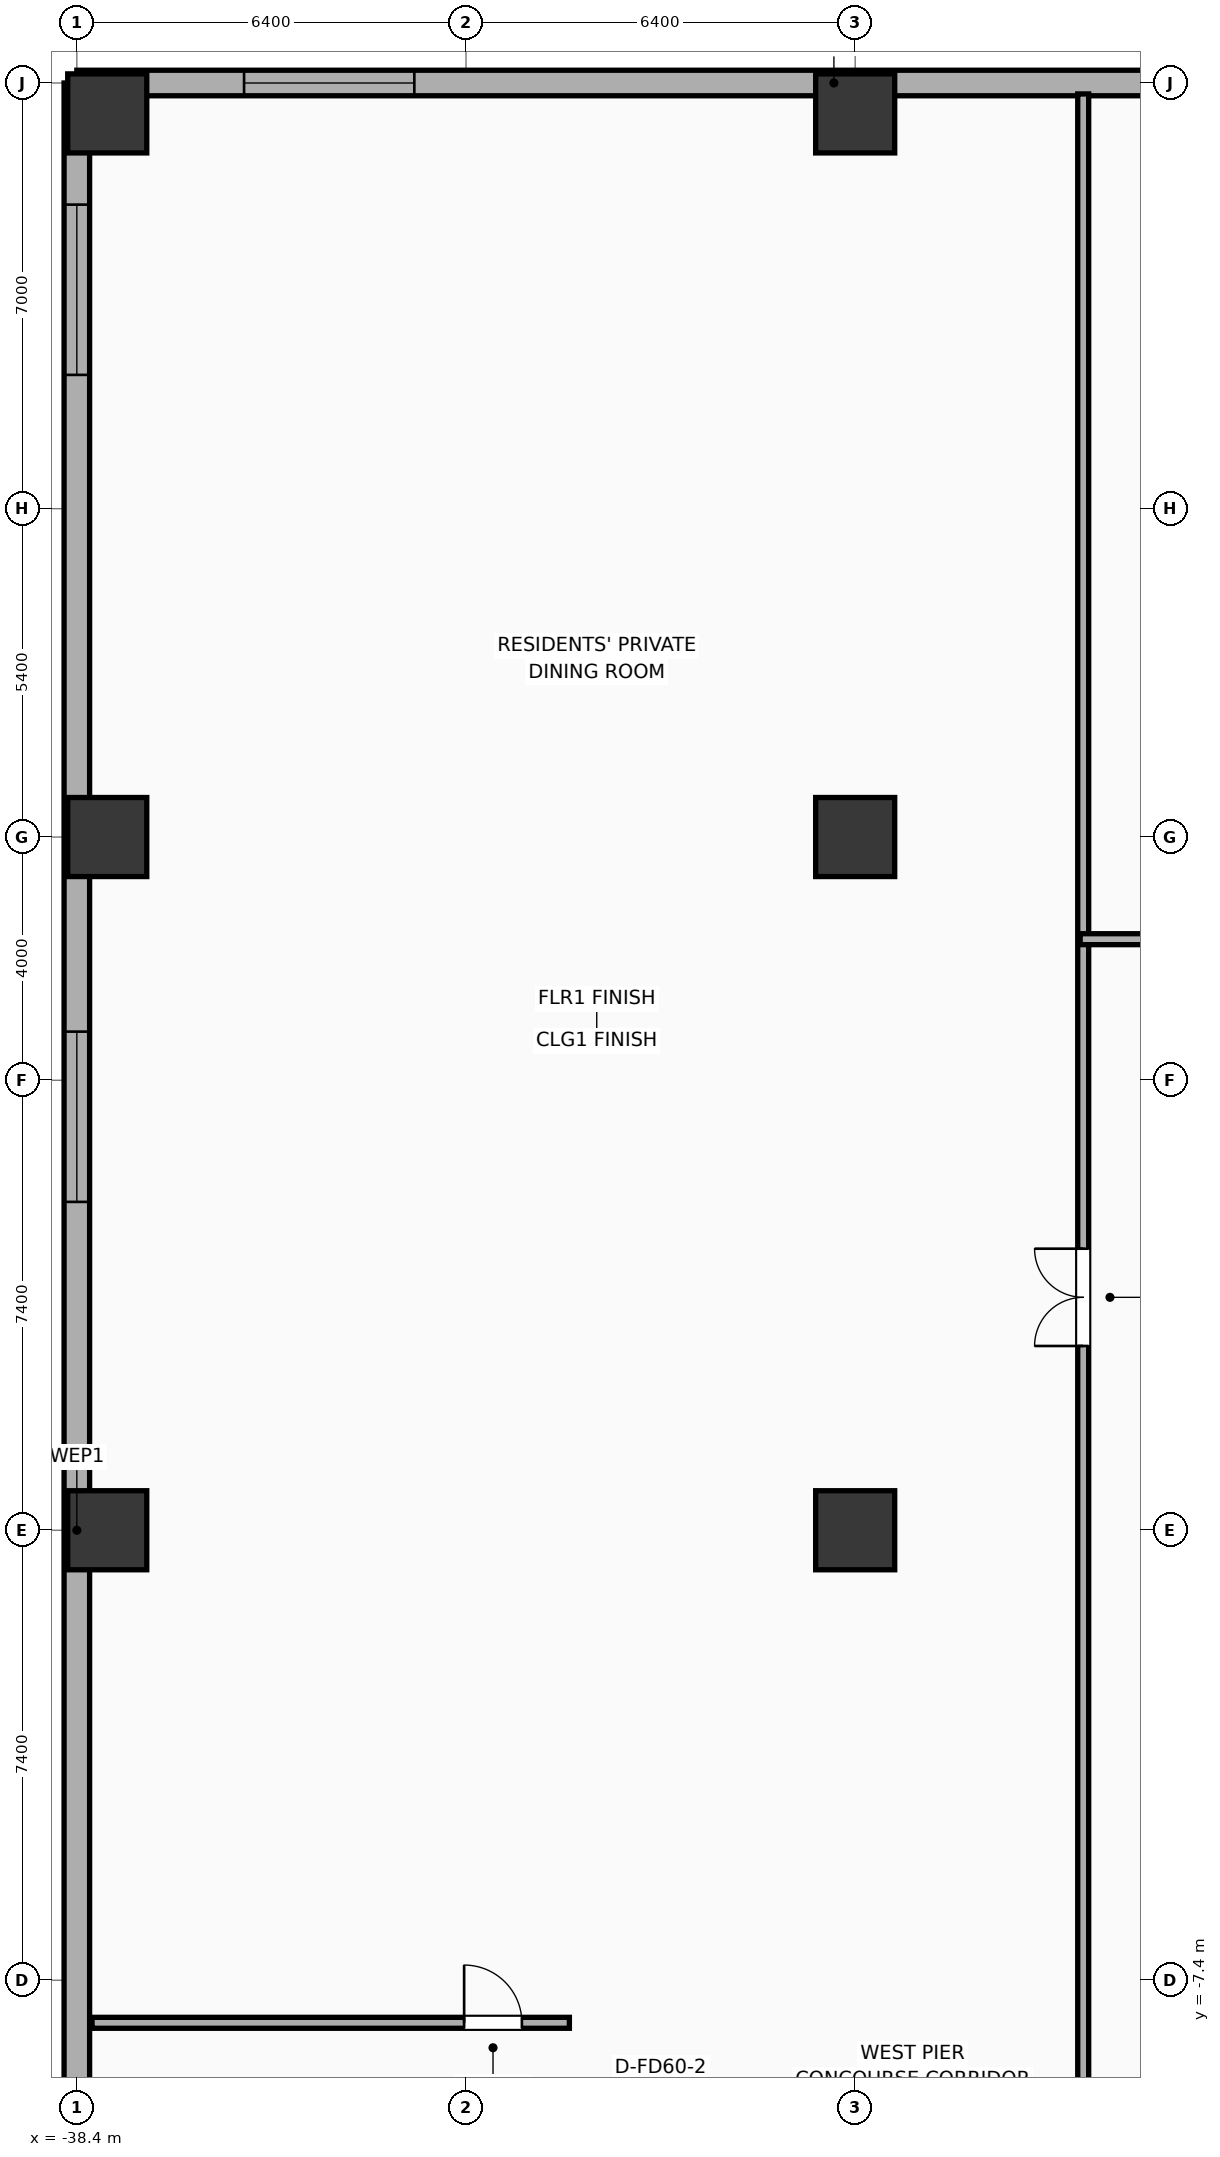
"""IFC4 building model, lengths in metres.
Left out: names, types, materials, properties, quantities, classifications, styles, units other than length and angle.
Written with IfcOpenShell. Run it as: python <this file> out.ifc"""

import sys

from ifc_helpers import new_model, si_unit, direction, frame, frame_2d, origin, origin_2d, place, context, subcontext, project, spatial, rectangle, extrude, element, fill, save


model = new_model("IFC4")
c1 = context("Model", 3, precision=1e-05, world=origin(), true_north=direction((0.0, 1.0)))
c2 = subcontext(c1, "Body", "Model", "MODEL_VIEW")
j1 = project(units=[si_unit("LENGTHUNIT", "METRE"), si_unit("PLANEANGLEUNIT", "RADIAN")], contexts=[c1])
p1 = place(None, origin())
s1 = spatial("IfcSite", under=j1, at=p1, CompositionType="ELEMENT")
p2 = place(p1, origin())
s2 = spatial("IfcBuilding", under=s1, at=p2, CompositionType="ELEMENT")
p3 = place(p2, frame((0.0, 0.0, 15.6)))
s3 = spatial("IfcBuildingStorey", under=s2, at=p3, CompositionType="ELEMENT", Elevation=15.6)
for number, where, z_axis, x_axis in (
    (1, (-37.9, 0.0, 0.0), (0.0, 0.0, 1.0), (1.0, 0.0, 0.0)),
    (2, (-37.9, 11.4, 0.0), (0.0, 0.0, 1.0), (1.0, 0.0, 0.0)),
    (3, (-37.9, 23.3, 0.0), (0.0, 0.0, 1.0), (1.0, 0.0, 0.0)),
    (4, (-25.6, 0.0, 0.0), (0.0, 0.0, 1.0), (1.0, 0.0, 0.0)),
    (5, (-25.6, 11.4, 0.0), (0.0, 0.0, 1.0), (1.0, 0.0, 0.0)),
    (6, (-25.6, 23.3, 0.0), (0.0, 0.0, 1.0), (1.0, 0.0, 0.0)),
):
    element("IfcColumn", number, at=place(p3, frame(where, z_axis=z_axis, x_axis=x_axis)), inside=s3, PredefinedType="COLUMN", context=c2, shape_type="SweptSolid", body=[
        extrude(rectangle(XDim=1.3, YDim=1.3, at=origin_2d()), origin(), (0.0, 0.0, 1.0), 5.2),
    ])
p4 = place(p3, frame((-13.5, 23.8, 0.0), z_axis=(0.0, 0.0, 1.0), x_axis=(-1.0, 0.0, 0.0)))
e7 = element("IfcWall", 7, at=p4, inside=s3, PredefinedType="ELEMENTEDWALL", context=c2, shape_type="SweptSolid", body=[
    extrude(rectangle(XDim=24.9, YDim=0.42, at=frame_2d((12.45, 0.0))), origin(), (0.0, 0.0, 1.0), 4.8),
])
p5 = place(p4, frame((2.75, 0.0, 0.65)))
e8 = element("IfcOpeningElement", 8, at=p5, cuts=e7, PredefinedType="OPENING", context=c2, shape_type="SweptSolid", body=[
    extrude(rectangle(XDim=2.8, YDim=2.6, at=frame_2d((1.4, 1.3))), frame((0.0, 0.22, 0.0), z_axis=(0.0, -1.0, 0.0), x_axis=(1.0, 0.0, 0.0)), (0.0, 0.0, 1.0), 0.44),
])
p6 = place(p4, frame((19.35, 0.0, 0.65)))
e9 = element("IfcOpeningElement", 9, at=p6, cuts=e7, PredefinedType="OPENING", context=c2, shape_type="SweptSolid", body=[
    extrude(rectangle(XDim=2.8, YDim=2.6, at=frame_2d((1.4, 1.3))), frame((0.0, 0.22, 0.0), z_axis=(0.0, -1.0, 0.0), x_axis=(1.0, 0.0, 0.0)), (0.0, 0.0, 1.0), 0.44),
])
p7 = place(p3, frame((-38.4, 23.8, 0.0), z_axis=(0.0, 0.0, 1.0), x_axis=(0.0, -1.0, 0.0)))
e10 = element("IfcWall", 10, at=p7, inside=s3, PredefinedType="ELEMENTEDWALL", context=c2, shape_type="SweptSolid", body=[
    extrude(rectangle(XDim=47.6, YDim=0.42, at=frame_2d((23.8, 0.0))), origin(), (0.0, 0.0, 1.0), 4.8),
])
p8 = place(p7, frame((2.0, 0.0, 0.65)))
e11 = element("IfcOpeningElement", 11, at=p8, cuts=e10, PredefinedType="OPENING", context=c2, shape_type="SweptSolid", body=[
    extrude(rectangle(XDim=2.8, YDim=2.6, at=frame_2d((1.4, 1.3))), frame((0.0, 0.22, 0.0), z_axis=(0.0, -1.0, 0.0), x_axis=(1.0, 0.0, 0.0)), (0.0, 0.0, 1.0), 0.44),
])
p9 = place(p7, frame((15.6, 0.0, 0.65)))
e12 = element("IfcOpeningElement", 12, at=p9, cuts=e10, PredefinedType="OPENING", context=c2, shape_type="SweptSolid", body=[
    extrude(rectangle(XDim=2.8, YDim=2.6, at=frame_2d((1.4, 1.3))), frame((0.0, 0.22, 0.0), z_axis=(0.0, -1.0, 0.0), x_axis=(1.0, 0.0, 0.0)), (0.0, 0.0, 1.0), 0.44),
])
p10 = place(p7, frame((42.8, 0.0, 0.65)))
e13 = element("IfcOpeningElement", 13, at=p10, cuts=e10, PredefinedType="OPENING", context=c2, shape_type="SweptSolid", body=[
    extrude(rectangle(XDim=2.8, YDim=2.6, at=frame_2d((1.4, 1.3))), frame((0.0, 0.22, 0.0), z_axis=(0.0, -1.0, 0.0), x_axis=(1.0, 0.0, 0.0)), (0.0, 0.0, 1.0), 0.44),
])
p11 = place(p3, frame((-38.15, -8.1, 0.0), z_axis=(0.0, 0.0, 1.0), x_axis=(1.0, 0.0, 0.0)))
e14 = element("IfcWall", 14, at=p11, inside=s3, PredefinedType="PARTITIONING", context=c2, shape_type="SweptSolid", body=[
    extrude(rectangle(XDim=7.85, YDim=0.18, at=frame_2d((3.925, 0.0))), origin(), (0.0, 0.0, 1.0), 4.8),
])
p12 = place(p11, frame((6.119, 0.0, 0.0)))
e15 = element("IfcOpeningElement", 15, at=p12, cuts=e14, PredefinedType="OPENING", context=c2, shape_type="SweptSolid", body=[
    extrude(rectangle(XDim=0.95, YDim=2.05, at=frame_2d((0.475, 1.025))), frame((0.0, 0.1, 0.0), z_axis=(0.0, -1.0, 0.0), x_axis=(1.0, 0.0, 0.0)), (0.0, 0.0, 1.0), 0.2),
])
p13 = place(p3, frame((-21.85, -10.5, 0.0), z_axis=(0.0, 0.0, 1.0), x_axis=(0.0, 1.0, 0.0)))
e16 = element("IfcWall", 16, at=p13, inside=s3, PredefinedType="PARTITIONING", context=c2, shape_type="SweptSolid", body=[
    extrude(rectangle(XDim=34.12, YDim=0.18, at=frame_2d((17.06, 0.0))), origin(), (0.0, 0.0, 1.0), 4.8),
])
p14 = place(p13, frame((13.531, 0.0, 0.0)))
e17 = element("IfcOpeningElement", 17, at=p14, cuts=e16, PredefinedType="OPENING", context=c2, shape_type="SweptSolid", body=[
    extrude(rectangle(XDim=1.6, YDim=2.05, at=frame_2d((0.8, 1.025))), frame((0.0, 0.1, 0.0), z_axis=(0.0, -1.0, 0.0), x_axis=(1.0, 0.0, 0.0)), (0.0, 0.0, 1.0), 0.2),
])
p15 = place(p3, frame((-21.9, 9.72, 0.0), z_axis=(0.0, 0.0, 1.0), x_axis=(1.0, 0.0, 0.0)))
e18 = element("IfcWall", 18, at=p15, inside=s3, PredefinedType="PARTITIONING", context=c2, shape_type="SweptSolid", body=[
    extrude(rectangle(XDim=8.38, YDim=0.18, at=frame_2d((4.19, 0.0))), origin(), (0.0, 0.0, 1.0), 4.8),
])
p16 = place(p15, frame((3.39, 0.0, 0.0)))
e19 = element("IfcOpeningElement", 19, at=p16, cuts=e18, PredefinedType="OPENING", context=c2, shape_type="SweptSolid", body=[
    extrude(rectangle(XDim=1.6, YDim=2.05, at=frame_2d((0.8, 1.025))), frame((0.0, 0.1, 0.0), z_axis=(0.0, -1.0, 0.0), x_axis=(1.0, 0.0, 0.0)), (0.0, 0.0, 1.0), 0.2),
])
p17 = place(p6, origin())
e20 = element("IfcWindow", 20, at=p17, inside=s3, PartitioningType="SINGLE_PANEL", PredefinedType="WINDOW", context=c2, shape_type="SweptSolid", body=[
    extrude(rectangle(XDim=2.8, YDim=2.6, at=frame_2d((1.4, 1.3))), frame((0.0, 0.03, 0.0), z_axis=(0.0, -1.0, 0.0), x_axis=(1.0, 0.0, 0.0)), (0.0, 0.0, 1.0), 0.06),
])
fill(e9, e20)
p18 = place(p8, origin())
e21 = element("IfcWindow", 21, at=p18, inside=s3, PartitioningType="SINGLE_PANEL", PredefinedType="WINDOW", context=c2, shape_type="SweptSolid", body=[
    extrude(rectangle(XDim=2.8, YDim=2.6, at=frame_2d((1.4, 1.3))), frame((0.0, 0.03, 0.0), z_axis=(0.0, -1.0, 0.0), x_axis=(1.0, 0.0, 0.0)), (0.0, 0.0, 1.0), 0.06),
])
fill(e11, e21)
p19 = place(p9, origin())
e22 = element("IfcWindow", 22, at=p19, inside=s3, PartitioningType="SINGLE_PANEL", PredefinedType="WINDOW", context=c2, shape_type="SweptSolid", body=[
    extrude(rectangle(XDim=2.8, YDim=2.6, at=frame_2d((1.4, 1.3))), frame((0.0, 0.03, 0.0), z_axis=(0.0, -1.0, 0.0), x_axis=(1.0, 0.0, 0.0)), (0.0, 0.0, 1.0), 0.06),
])
fill(e12, e22)
p20 = place(p12, origin())
e23 = element("IfcDoor", 23, at=p20, inside=s3, OperationType="SINGLE_SWING_LEFT", PredefinedType="DOOR", context=c2, shape_type="SweptSolid", body=[
    extrude(rectangle(XDim=0.95, YDim=2.05, at=frame_2d((0.475, 1.025))), frame((0.0, 0.025, 0.0), z_axis=(0.0, -1.0, 0.0), x_axis=(1.0, 0.0, 0.0)), (0.0, 0.0, 1.0), 0.05),
])
fill(e15, e23)
p21 = place(p14, origin())
e24 = element("IfcDoor", 24, at=p21, inside=s3, OperationType="DOUBLE_DOOR_SINGLE_SWING", PredefinedType="DOOR", context=c2, shape_type="SweptSolid", body=[
    extrude(rectangle(XDim=1.6, YDim=2.05, at=frame_2d((0.8, 1.025))), frame((0.0, 0.025, 0.0), z_axis=(0.0, -1.0, 0.0), x_axis=(1.0, 0.0, 0.0)), (0.0, 0.0, 1.0), 0.05),
])
fill(e17, e24)
save(model, sys.argv[1])
